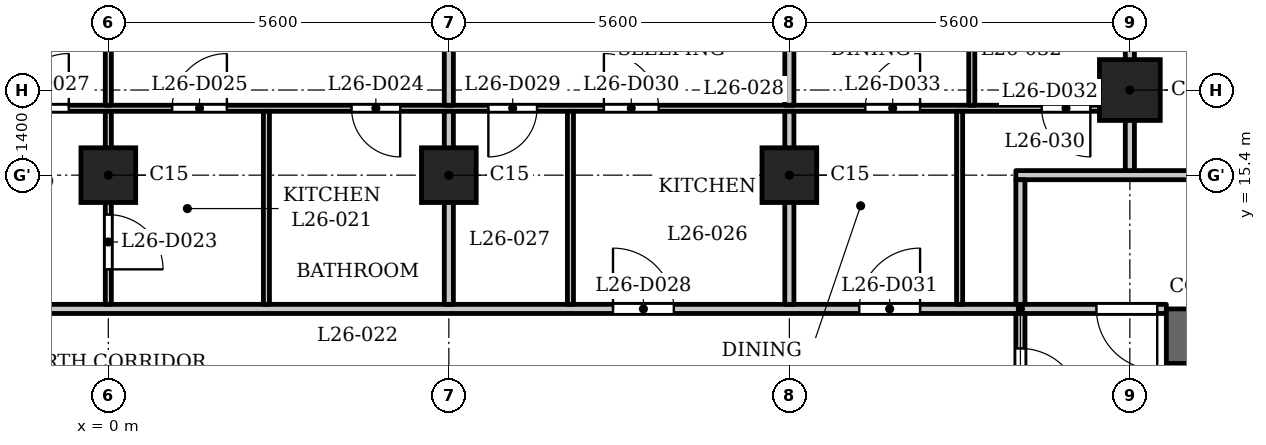
"""IFC4 building model, lengths in metres.
Left out: names, types, materials, properties, quantities, classifications, styles, units other than length and angle.
Written with IfcOpenShell. Run it as: python <this file> out.ifc"""

import sys

from ifc_helpers import new_model, si_unit, direction, frame, frame_2d, origin, origin_2d, place, context, subcontext, project, spatial, rectangle, extrude, element, fill, save


model = new_model("IFC4")
c1 = context("Model", 3, precision=1e-05, world=origin(), true_north=direction((0.0, 1.0)))
c2 = subcontext(c1, "Body", "Model", "MODEL_VIEW")
j1 = project(units=[si_unit("LENGTHUNIT", "METRE"), si_unit("PLANEANGLEUNIT", "RADIAN")], contexts=[c1])
p1 = place(None, origin())
s1 = spatial("IfcSite", under=j1, at=p1, CompositionType="ELEMENT")
p2 = place(p1, origin())
s2 = spatial("IfcBuilding", under=s1, at=p2, CompositionType="ELEMENT")
p3 = place(p2, frame((0.0, 0.0, 104.3)))
s3 = spatial("IfcBuildingStorey", under=s2, at=p3, CompositionType="ELEMENT", Elevation=104.3)
p4 = place(p3, frame((16.8, 16.8, 0.0), z_axis=(0.0, 0.0, 1.0), x_axis=(1.0, 0.0, 0.0)))
e1 = element("IfcColumn", 1, at=p4, inside=s3, PredefinedType="COLUMN", context=c2, shape_type="SweptSolid", body=[
    extrude(rectangle(XDim=1.0, YDim=1.0, at=origin_2d()), origin(), (0.0, 0.0, 1.0), 3.5),
])
for number, where, z_axis, x_axis in (
    (2, (0.0, 15.4, 0.0), (0.0, 0.0, 1.0), (1.0, 0.0, 0.0)),
    (3, (5.6, 15.4, 0.0), (0.0, 0.0, 1.0), (1.0, 0.0, 0.0)),
    (4, (11.2, 15.4, 0.0), (0.0, 0.0, 1.0), (1.0, 0.0, 0.0)),
):
    element("IfcColumn", number, at=place(p3, frame(where, z_axis=z_axis, x_axis=x_axis)), inside=s3, PredefinedType="COLUMN", context=c2, shape_type="SweptSolid", body=[
        extrude(rectangle(XDim=0.9, YDim=0.9, at=origin_2d()), origin(), (0.0, 0.0, 1.0), 3.5),
    ])
p5 = place(p3, frame((17.4, 12.75, 0.0), z_axis=(0.0, 0.0, 1.0), x_axis=(1.0, 0.0, 0.0)))
e5 = element("IfcWall", 5, at=p5, inside=s3, PredefinedType="SHEAR", context=c2, shape_type="SweptSolid", body=[
    extrude(rectangle(XDim=10.4, YDim=0.9, at=frame_2d((5.2, 0.0))), origin(), (0.0, 0.0, 1.0), 3.2),
])
p6 = place(p3, frame((17.6, -12.3, 0.0), z_axis=(0.0, 0.0, 1.0), x_axis=(0.0, 1.0, 0.0)))
e6 = element("IfcWall", 6, at=p6, inside=s3, PredefinedType="SHEAR", context=c2, shape_type="SweptSolid", body=[
    extrude(rectangle(XDim=24.6, YDim=0.4, at=frame_2d((12.3, 0.0))), origin(), (0.0, 0.0, 1.0), 3.2),
])
p7 = place(p6, frame((6.0, 0.0, 0.0)))
e7 = element("IfcOpeningElement", 7, at=p7, cuts=e6, PredefinedType="OPENING", context=c2, shape_type="SweptSolid", body=[
    extrude(rectangle(XDim=1.1, YDim=2.1, at=frame_2d((0.55, 1.05))), frame((0.0, 0.21, 0.0), z_axis=(0.0, -1.0, 0.0), x_axis=(1.0, 0.0, 0.0)), (0.0, 0.0, 1.0), 0.42),
])
p8 = place(p6, frame((8.4, 0.0, 0.0)))
e8 = element("IfcOpeningElement", 8, at=p8, cuts=e6, PredefinedType="OPENING", context=c2, shape_type="SweptSolid", body=[
    extrude(rectangle(XDim=1.1, YDim=2.1, at=frame_2d((0.55, 1.05))), frame((0.0, 0.21, 0.0), z_axis=(0.0, -1.0, 0.0), x_axis=(1.0, 0.0, 0.0)), (0.0, 0.0, 1.0), 0.42),
])
p9 = place(p6, frame((10.8, 0.0, 0.0)))
e9 = element("IfcOpeningElement", 9, at=p9, cuts=e6, PredefinedType="OPENING", context=c2, shape_type="SweptSolid", body=[
    extrude(rectangle(XDim=1.1, YDim=2.1, at=frame_2d((0.55, 1.05))), frame((0.0, 0.21, 0.0), z_axis=(0.0, -1.0, 0.0), x_axis=(1.0, 0.0, 0.0)), (0.0, 0.0, 1.0), 0.42),
])
p10 = place(p6, frame((16.75, 0.0, 0.0)))
e10 = element("IfcOpeningElement", 10, at=p10, cuts=e6, PredefinedType="OPENING", context=c2, shape_type="SweptSolid", body=[
    extrude(rectangle(XDim=0.9, YDim=2.1, at=frame_2d((0.45, 1.05))), frame((0.0, 0.21, 0.0), z_axis=(0.0, -1.0, 0.0), x_axis=(1.0, 0.0, 0.0)), (0.0, 0.0, 1.0), 0.42),
])
p11 = place(p6, frame((22.8, 0.0, 0.0)))
e11 = element("IfcOpeningElement", 11, at=p11, cuts=e6, PredefinedType="OPENING", context=c2, shape_type="SweptSolid", body=[
    extrude(rectangle(XDim=1.1, YDim=2.1, at=frame_2d((0.55, 1.05))), frame((0.0, 0.21, 0.0), z_axis=(0.0, -1.0, 0.0), x_axis=(1.0, 0.0, 0.0)), (0.0, 0.0, 1.0), 0.42),
])
p12 = place(p6, frame((0.7, 0.0, 0.0)))
e12 = element("IfcOpeningElement", 12, at=p12, cuts=e6, PredefinedType="OPENING", context=c2, shape_type="SweptSolid", body=[
    extrude(rectangle(XDim=1.1, YDim=2.1, at=frame_2d((0.55, 1.05))), frame((0.0, 0.21, 0.0), z_axis=(0.0, -1.0, 0.0), x_axis=(1.0, 0.0, 0.0)), (0.0, 0.0, 1.0), 0.42),
])
p13 = place(p6, frame((12.775, 0.0, 0.0)))
e13 = element("IfcOpeningElement", 13, at=p13, cuts=e6, PredefinedType="OPENING", context=c2, shape_type="SweptSolid", body=[
    extrude(rectangle(XDim=1.8, YDim=2.1, at=frame_2d((0.9, 1.05))), frame((0.0, 0.21, 0.0), z_axis=(0.0, -1.0, 0.0), x_axis=(1.0, 0.0, 0.0)), (0.0, 0.0, 1.0), 0.42),
])
p14 = place(p3, frame((-17.4, 13.2, 0.0), z_axis=(0.0, 0.0, 1.0), x_axis=(1.0, 0.0, 0.0)))
e14 = element("IfcWall", 14, at=p14, inside=s3, PredefinedType="PARTITIONING", context=c2, shape_type="SweptSolid", body=[
    extrude(rectangle(XDim=34.8, YDim=0.15, at=frame_2d((17.4, 0.0))), origin(), (0.0, 0.0, 1.0), 3.2),
])
p15 = place(p14, frame((0.25, 0.0, 0.0)))
e15 = element("IfcOpeningElement", 15, at=p15, cuts=e14, PredefinedType="OPENING", context=c2, shape_type="SweptSolid", body=[
    extrude(rectangle(XDim=1.0, YDim=2.1, at=frame_2d((0.5, 1.05))), frame((0.0, 0.085, 0.0), z_axis=(0.0, -1.0, 0.0), x_axis=(1.0, 0.0, 0.0)), (0.0, 0.0, 1.0), 0.17),
])
p16 = place(p14, frame((33.65, 0.0, 0.0)))
e16 = element("IfcOpeningElement", 16, at=p16, cuts=e14, PredefinedType="OPENING", context=c2, shape_type="SweptSolid", body=[
    extrude(rectangle(XDim=1.0, YDim=2.1, at=frame_2d((0.5, 1.05))), frame((0.0, 0.085, 0.0), z_axis=(0.0, -1.0, 0.0), x_axis=(1.0, 0.0, 0.0)), (0.0, 0.0, 1.0), 0.17),
])
p17 = place(p14, frame((4.55, 0.0, 0.0)))
e17 = element("IfcOpeningElement", 17, at=p17, cuts=e14, PredefinedType="OPENING", context=c2, shape_type="SweptSolid", body=[
    extrude(rectangle(XDim=1.0, YDim=2.1, at=frame_2d((0.5, 1.05))), frame((0.0, 0.085, 0.0), z_axis=(0.0, -1.0, 0.0), x_axis=(1.0, 0.0, 0.0)), (0.0, 0.0, 1.0), 0.17),
])
p18 = place(p14, frame((6.85, 0.0, 0.0)))
e18 = element("IfcOpeningElement", 18, at=p18, cuts=e14, PredefinedType="OPENING", context=c2, shape_type="SweptSolid", body=[
    extrude(rectangle(XDim=1.0, YDim=2.1, at=frame_2d((0.5, 1.05))), frame((0.0, 0.085, 0.0), z_axis=(0.0, -1.0, 0.0), x_axis=(1.0, 0.0, 0.0)), (0.0, 0.0, 1.0), 0.17),
])
p19 = place(p14, frame((12.5, 0.0, 0.0)))
e19 = element("IfcOpeningElement", 19, at=p19, cuts=e14, PredefinedType="OPENING", context=c2, shape_type="SweptSolid", body=[
    extrude(rectangle(XDim=1.0, YDim=2.1, at=frame_2d((0.5, 1.05))), frame((0.0, 0.085, 0.0), z_axis=(0.0, -1.0, 0.0), x_axis=(1.0, 0.0, 0.0)), (0.0, 0.0, 1.0), 0.17),
])
p20 = place(p14, frame((25.7, 0.0, 0.0)))
e20 = element("IfcOpeningElement", 20, at=p20, cuts=e14, PredefinedType="OPENING", context=c2, shape_type="SweptSolid", body=[
    extrude(rectangle(XDim=1.0, YDim=2.1, at=frame_2d((0.5, 1.05))), frame((0.0, 0.085, 0.0), z_axis=(0.0, -1.0, 0.0), x_axis=(1.0, 0.0, 0.0)), (0.0, 0.0, 1.0), 0.17),
])
p21 = place(p14, frame((29.75, 0.0, 0.0)))
e21 = element("IfcOpeningElement", 21, at=p21, cuts=e14, PredefinedType="OPENING", context=c2, shape_type="SweptSolid", body=[
    extrude(rectangle(XDim=1.0, YDim=2.1, at=frame_2d((0.5, 1.05))), frame((0.0, 0.085, 0.0), z_axis=(0.0, -1.0, 0.0), x_axis=(1.0, 0.0, 0.0)), (0.0, 0.0, 1.0), 0.17),
])
p22 = place(p3, frame((14.925, 15.4, 0.0), z_axis=(0.0, 0.0, 1.0), x_axis=(1.0, 0.0, 0.0)))
e22 = element("IfcWall", 22, at=p22, inside=s3, PredefinedType="PARTITIONING", context=c2, shape_type="SweptSolid", body=[
    extrude(rectangle(XDim=12.559, YDim=0.15, at=frame_2d((6.279, 0.0))), origin(), (0.0, 0.0, 1.0), 3.2),
])
p23 = place(p22, frame((5.825, 0.0, 0.0)))
e23 = element("IfcOpeningElement", 23, at=p23, cuts=e22, PredefinedType="OPENING", context=c2, shape_type="SweptSolid", body=[
    extrude(rectangle(XDim=1.0, YDim=2.1, at=frame_2d((0.5, 1.05))), frame((0.0, 0.085, 0.0), z_axis=(0.0, -1.0, 0.0), x_axis=(1.0, 0.0, 0.0)), (0.0, 0.0, 1.0), 0.17),
])
p24 = place(p3, frame((-16.725, 16.5, 0.0), z_axis=(0.0, 0.0, 1.0), x_axis=(1.0, 0.0, 0.0)))
e24 = element("IfcWall", 24, at=p24, inside=s3, PredefinedType="PARTITIONING", context=c2, shape_type="SweptSolid", body=[
    extrude(rectangle(XDim=33.45, YDim=0.1, at=frame_2d((16.725, 0.0))), origin(), (0.0, 0.0, 1.0), 3.2),
])
p25 = place(p24, frame((1.075, 0.0, 0.0)))
e25 = element("IfcOpeningElement", 25, at=p25, cuts=e24, PredefinedType="OPENING", context=c2, shape_type="SweptSolid", body=[
    extrude(rectangle(XDim=0.8, YDim=2.1, at=frame_2d((0.4, 1.05))), frame((0.0, 0.06, 0.0), z_axis=(0.0, -1.0, 0.0), x_axis=(1.0, 0.0, 0.0)), (0.0, 0.0, 1.0), 0.12),
])
p26 = place(p24, frame((3.975, 0.0, 0.0)))
e26 = element("IfcOpeningElement", 26, at=p26, cuts=e24, PredefinedType="OPENING", context=c2, shape_type="SweptSolid", body=[
    extrude(rectangle(XDim=0.9, YDim=2.1, at=frame_2d((0.45, 1.05))), frame((0.0, 0.06, 0.0), z_axis=(0.0, -1.0, 0.0), x_axis=(1.0, 0.0, 0.0)), (0.0, 0.0, 1.0), 0.12),
])
p27 = place(p24, frame((8.975, 0.0, 0.0)))
e27 = element("IfcOpeningElement", 27, at=p27, cuts=e24, PredefinedType="OPENING", context=c2, shape_type="SweptSolid", body=[
    extrude(rectangle(XDim=0.8, YDim=2.1, at=frame_2d((0.4, 1.05))), frame((0.0, 0.06, 0.0), z_axis=(0.0, -1.0, 0.0), x_axis=(1.0, 0.0, 0.0)), (0.0, 0.0, 1.0), 0.12),
])
p28 = place(p24, frame((6.325, 0.0, 0.0)))
e28 = element("IfcOpeningElement", 28, at=p28, cuts=e24, PredefinedType="OPENING", context=c2, shape_type="SweptSolid", body=[
    extrude(rectangle(XDim=0.9, YDim=2.1, at=frame_2d((0.45, 1.05))), frame((0.0, 0.06, 0.0), z_axis=(0.0, -1.0, 0.0), x_axis=(1.0, 0.0, 0.0)), (0.0, 0.0, 1.0), 0.12),
])
p29 = place(p24, frame((20.725, 0.0, 0.0)))
e29 = element("IfcOpeningElement", 29, at=p29, cuts=e24, PredefinedType="OPENING", context=c2, shape_type="SweptSolid", body=[
    extrude(rectangle(XDim=0.8, YDim=2.1, at=frame_2d((0.4, 1.05))), frame((0.0, 0.06, 0.0), z_axis=(0.0, -1.0, 0.0), x_axis=(1.0, 0.0, 0.0)), (0.0, 0.0, 1.0), 0.12),
])
p30 = place(p24, frame((17.775, 0.0, 0.0)))
e30 = element("IfcOpeningElement", 30, at=p30, cuts=e24, PredefinedType="OPENING", context=c2, shape_type="SweptSolid", body=[
    extrude(rectangle(XDim=0.9, YDim=2.1, at=frame_2d((0.45, 1.05))), frame((0.0, 0.06, 0.0), z_axis=(0.0, -1.0, 0.0), x_axis=(1.0, 0.0, 0.0)), (0.0, 0.0, 1.0), 0.12),
])
p31 = place(p24, frame((11.825, 0.0, 0.0)))
e31 = element("IfcOpeningElement", 31, at=p31, cuts=e24, PredefinedType="OPENING", context=c2, shape_type="SweptSolid", body=[
    extrude(rectangle(XDim=0.9, YDim=2.1, at=frame_2d((0.45, 1.05))), frame((0.0, 0.06, 0.0), z_axis=(0.0, -1.0, 0.0), x_axis=(1.0, 0.0, 0.0)), (0.0, 0.0, 1.0), 0.12),
])
p32 = place(p24, frame((15.175, 0.0, 0.0)))
e32 = element("IfcOpeningElement", 32, at=p32, cuts=e24, PredefinedType="OPENING", context=c2, shape_type="SweptSolid", body=[
    extrude(rectangle(XDim=0.9, YDim=2.1, at=frame_2d((0.45, 1.05))), frame((0.0, 0.06, 0.0), z_axis=(0.0, -1.0, 0.0), x_axis=(1.0, 0.0, 0.0)), (0.0, 0.0, 1.0), 0.12),
])
p33 = place(p24, frame((22.975, 0.0, 0.0)))
e33 = element("IfcOpeningElement", 33, at=p33, cuts=e24, PredefinedType="OPENING", context=c2, shape_type="SweptSolid", body=[
    extrude(rectangle(XDim=0.8, YDim=2.1, at=frame_2d((0.4, 1.05))), frame((0.0, 0.06, 0.0), z_axis=(0.0, -1.0, 0.0), x_axis=(1.0, 0.0, 0.0)), (0.0, 0.0, 1.0), 0.12),
])
p34 = place(p24, frame((24.875, 0.0, 0.0)))
e34 = element("IfcOpeningElement", 34, at=p34, cuts=e24, PredefinedType="OPENING", context=c2, shape_type="SweptSolid", body=[
    extrude(rectangle(XDim=0.9, YDim=2.1, at=frame_2d((0.45, 1.05))), frame((0.0, 0.06, 0.0), z_axis=(0.0, -1.0, 0.0), x_axis=(1.0, 0.0, 0.0)), (0.0, 0.0, 1.0), 0.12),
])
p35 = place(p24, frame((32.075, 0.0, 0.0)))
e35 = element("IfcOpeningElement", 35, at=p35, cuts=e24, PredefinedType="OPENING", context=c2, shape_type="SweptSolid", body=[
    extrude(rectangle(XDim=0.8, YDim=2.1, at=frame_2d((0.4, 1.05))), frame((0.0, 0.06, 0.0), z_axis=(0.0, -1.0, 0.0), x_axis=(1.0, 0.0, 0.0)), (0.0, 0.0, 1.0), 0.12),
])
p36 = place(p24, frame((29.175, 0.0, 0.0)))
e36 = element("IfcOpeningElement", 36, at=p36, cuts=e24, PredefinedType="OPENING", context=c2, shape_type="SweptSolid", body=[
    extrude(rectangle(XDim=0.9, YDim=2.1, at=frame_2d((0.45, 1.05))), frame((0.0, 0.06, 0.0), z_axis=(0.0, -1.0, 0.0), x_axis=(1.0, 0.0, 0.0)), (0.0, 0.0, 1.0), 0.12),
])
p37 = place(p3, frame((0.0, 13.275, 0.0), z_axis=(0.0, 0.0, 1.0), x_axis=(0.0, 1.0, 0.0)))
e37 = element("IfcWall", 37, at=p37, inside=s3, PredefinedType="PARTITIONING", context=c2, shape_type="SweptSolid", body=[
    extrude(rectangle(XDim=3.175, YDim=0.1, at=frame_2d((1.587, 0.0))), origin(), (0.0, 0.0, 1.0), 3.2),
])
p38 = place(p37, frame((0.576, 0.0, 0.0)))
e38 = element("IfcOpeningElement", 38, at=p38, cuts=e37, PredefinedType="OPENING", context=c2, shape_type="SweptSolid", body=[
    extrude(rectangle(XDim=0.9, YDim=2.1, at=frame_2d((0.45, 1.05))), frame((0.0, 0.06, 0.0), z_axis=(0.0, -1.0, 0.0), x_axis=(1.0, 0.0, 0.0)), (0.0, 0.0, 1.0), 0.12),
])
p39 = place(p3, frame((0.0, 16.55, 0.0), z_axis=(0.0, 0.0, 1.0), x_axis=(0.0, 1.0, 0.0)))
e39 = element("IfcWall", 39, at=p39, inside=s3, PredefinedType="PARTITIONING", context=c2, shape_type="SweptSolid", body=[
    extrude(rectangle(XDim=6.48, YDim=0.1, at=frame_2d((3.24, 0.0))), origin(), (0.0, 0.0, 1.0), 3.2),
])
p40 = place(p3, frame((2.6, 13.275, 0.0), z_axis=(0.0, 0.0, 1.0), x_axis=(0.0, 1.0, 0.0)))
e40 = element("IfcWall", 40, at=p40, inside=s3, PredefinedType="PARTITIONING", context=c2, shape_type="SweptSolid", body=[
    extrude(rectangle(XDim=3.175, YDim=0.1, at=frame_2d((1.587, 0.0))), origin(), (0.0, 0.0, 1.0), 3.2),
])
p41 = place(p3, frame((5.6, 13.275, 0.0), z_axis=(0.0, 0.0, 1.0), x_axis=(0.0, 1.0, 0.0)))
e41 = element("IfcWall", 41, at=p41, inside=s3, PredefinedType="PARTITIONING", context=c2, shape_type="SweptSolid", body=[
    extrude(rectangle(XDim=3.175, YDim=0.15, at=frame_2d((1.587, 0.0))), origin(), (0.0, 0.0, 1.0), 3.2),
])
p42 = place(p3, frame((5.6, 16.55, 0.0), z_axis=(0.0, 0.0, 1.0), x_axis=(0.0, 1.0, 0.0)))
e42 = element("IfcWall", 42, at=p42, inside=s3, PredefinedType="PARTITIONING", context=c2, shape_type="SweptSolid", body=[
    extrude(rectangle(XDim=6.48, YDim=0.15, at=frame_2d((3.24, 0.0))), origin(), (0.0, 0.0, 1.0), 3.2),
])
p43 = place(p3, frame((7.6, 13.275, 0.0), z_axis=(0.0, 0.0, 1.0), x_axis=(0.0, 1.0, 0.0)))
e43 = element("IfcWall", 43, at=p43, inside=s3, PredefinedType="PARTITIONING", context=c2, shape_type="SweptSolid", body=[
    extrude(rectangle(XDim=3.175, YDim=0.1, at=frame_2d((1.587, 0.0))), origin(), (0.0, 0.0, 1.0), 3.2),
])
p44 = place(p3, frame((11.2, 13.275, 0.0), z_axis=(0.0, 0.0, 1.0), x_axis=(0.0, 1.0, 0.0)))
e44 = element("IfcWall", 44, at=p44, inside=s3, PredefinedType="PARTITIONING", context=c2, shape_type="SweptSolid", body=[
    extrude(rectangle(XDim=3.175, YDim=0.15, at=frame_2d((1.587, 0.0))), origin(), (0.0, 0.0, 1.0), 3.2),
])
p45 = place(p3, frame((11.2, 16.55, 0.0), z_axis=(0.0, 0.0, 1.0), x_axis=(0.0, 1.0, 0.0)))
e45 = element("IfcWall", 45, at=p45, inside=s3, PredefinedType="PARTITIONING", context=c2, shape_type="SweptSolid", body=[
    extrude(rectangle(XDim=6.48, YDim=0.15, at=frame_2d((3.24, 0.0))), origin(), (0.0, 0.0, 1.0), 3.2),
])
p46 = place(p3, frame((14.0, 13.275, 0.0), z_axis=(0.0, 0.0, 1.0), x_axis=(0.0, 1.0, 0.0)))
e46 = element("IfcWall", 46, at=p46, inside=s3, PredefinedType="PARTITIONING", context=c2, shape_type="SweptSolid", body=[
    extrude(rectangle(XDim=3.175, YDim=0.1, at=frame_2d((1.587, 0.0))), origin(), (0.0, 0.0, 1.0), 3.2),
])
p47 = place(p3, frame((14.2, 16.55, 0.0), z_axis=(0.0, 0.0, 1.0), x_axis=(0.0, 1.0, 0.0)))
e47 = element("IfcWall", 47, at=p47, inside=s3, PredefinedType="PARTITIONING", context=c2, shape_type="SweptSolid", body=[
    extrude(rectangle(XDim=5.53, YDim=0.1, at=frame_2d((2.765, 0.0))), origin(), (0.0, 0.0, 1.0), 3.2),
])
p48 = place(p47, frame((4.35, 0.0, 0.0)))
e48 = element("IfcOpeningElement", 48, at=p48, cuts=e47, PredefinedType="OPENING", context=c2, shape_type="SweptSolid", body=[
    extrude(rectangle(XDim=0.9, YDim=2.1, at=frame_2d((0.45, 1.05))), frame((0.0, 0.06, 0.0), z_axis=(0.0, -1.0, 0.0), x_axis=(1.0, 0.0, 0.0)), (0.0, 0.0, 1.0), 0.12),
])
p49 = place(p3, frame((15.0, 6.769, 0.0), z_axis=(0.0, 0.0, 1.0), x_axis=(0.0, 1.0, 0.0)))
e49 = element("IfcWall", 49, at=p49, inside=s3, PredefinedType="PARTITIONING", context=c2, shape_type="SweptSolid", body=[
    extrude(rectangle(XDim=6.356, YDim=0.15, at=frame_2d((3.178, 0.0))), origin(), (0.0, 0.0, 1.0), 3.2),
])
p50 = place(p49, frame((4.781, 0.0, 0.0)))
e50 = element("IfcOpeningElement", 50, at=p50, cuts=e49, PredefinedType="OPENING", context=c2, shape_type="SweptSolid", body=[
    extrude(rectangle(XDim=1.0, YDim=2.1, at=frame_2d((0.5, 1.05))), frame((0.0, 0.085, 0.0), z_axis=(0.0, -1.0, 0.0), x_axis=(1.0, 0.0, 0.0)), (0.0, 0.0, 1.0), 0.17),
])
p51 = place(p3, frame((15.0, 13.275, 0.0), z_axis=(0.0, 0.0, 1.0), x_axis=(0.0, 1.0, 0.0)))
e51 = element("IfcWall", 51, at=p51, inside=s3, PredefinedType="PARTITIONING", context=c2, shape_type="SweptSolid", body=[
    extrude(rectangle(XDim=2.05, YDim=0.15, at=frame_2d((1.025, 0.0))), origin(), (0.0, 0.0, 1.0), 3.2),
])
p52 = place(p3, frame((16.8, 15.475, 0.0), z_axis=(0.0, 0.0, 1.0), x_axis=(0.0, 1.0, 0.0)))
e52 = element("IfcWall", 52, at=p52, inside=s3, PredefinedType="PARTITIONING", context=c2, shape_type="SweptSolid", body=[
    extrude(rectangle(XDim=7.555, YDim=0.15, at=frame_2d((3.777, 0.0))), origin(), (0.0, 0.0, 1.0), 3.2),
])
p53 = place(p50, origin())
e53 = element("IfcDoor", 53, at=p53, inside=s3, OperationType="SINGLE_SWING_LEFT", PredefinedType="DOOR", context=c2, shape_type="SweptSolid", body=[
    extrude(rectangle(XDim=1.0, YDim=2.1, at=frame_2d((0.5, 1.05))), frame((0.0, 0.025, 0.0), z_axis=(0.0, -1.0, 0.0), x_axis=(1.0, 0.0, 0.0)), (0.0, 0.0, 1.0), 0.05),
])
fill(e50, e53)
p54 = place(p16, origin())
e54 = element("IfcDoor", 54, at=p54, inside=s3, OperationType="SINGLE_SWING_RIGHT", PredefinedType="DOOR", context=c2, shape_type="SweptSolid", body=[
    extrude(rectangle(XDim=1.0, YDim=2.1, at=frame_2d((0.5, 1.05))), frame((0.0, 0.025, 0.0), z_axis=(0.0, -1.0, 0.0), x_axis=(1.0, 0.0, 0.0)), (0.0, 0.0, 1.0), 0.05),
])
fill(e16, e54)
p55 = place(p38, origin())
e55 = element("IfcDoor", 55, at=p55, inside=s3, OperationType="SINGLE_SWING_LEFT", PredefinedType="DOOR", context=c2, shape_type="SweptSolid", body=[
    extrude(rectangle(XDim=0.9, YDim=2.1, at=frame_2d((0.45, 1.05))), frame((0.0, 0.025, 0.0), z_axis=(0.0, -1.0, 0.0), x_axis=(1.0, 0.0, 0.0)), (0.0, 0.0, 1.0), 0.05),
])
fill(e38, e55)
p56 = place(p29, origin())
e56 = element("IfcDoor", 56, at=p56, inside=s3, OperationType="SINGLE_SWING_RIGHT", PredefinedType="DOOR", context=c2, shape_type="SweptSolid", body=[
    extrude(rectangle(XDim=0.8, YDim=2.1, at=frame_2d((0.4, 1.05))), frame((0.0, 0.025, 0.0), z_axis=(0.0, -1.0, 0.0), x_axis=(1.0, 0.0, 0.0)), (0.0, 0.0, 1.0), 0.05),
])
fill(e29, e56)
p57 = place(p30, origin())
e57 = element("IfcDoor", 57, at=p57, inside=s3, OperationType="SINGLE_SWING_LEFT", PredefinedType="DOOR", context=c2, shape_type="SweptSolid", body=[
    extrude(rectangle(XDim=0.9, YDim=2.1, at=frame_2d((0.45, 1.05))), frame((0.0, 0.025, 0.0), z_axis=(0.0, -1.0, 0.0), x_axis=(1.0, 0.0, 0.0)), (0.0, 0.0, 1.0), 0.05),
])
fill(e30, e57)
p58 = place(p32, origin())
e58 = element("IfcDoor", 58, at=p58, inside=s3, OperationType="SINGLE_SWING_LEFT", PredefinedType="DOOR", context=c2, shape_type="SweptSolid", body=[
    extrude(rectangle(XDim=0.9, YDim=2.1, at=frame_2d((0.45, 1.05))), frame((0.0, 0.025, 0.0), z_axis=(0.0, -1.0, 0.0), x_axis=(1.0, 0.0, 0.0)), (0.0, 0.0, 1.0), 0.05),
])
fill(e32, e58)
p59 = place(p20, origin())
e59 = element("IfcDoor", 59, at=p59, inside=s3, OperationType="SINGLE_SWING_RIGHT", PredefinedType="DOOR", context=c2, shape_type="SweptSolid", body=[
    extrude(rectangle(XDim=1.0, YDim=2.1, at=frame_2d((0.5, 1.05))), frame((0.0, 0.025, 0.0), z_axis=(0.0, -1.0, 0.0), x_axis=(1.0, 0.0, 0.0)), (0.0, 0.0, 1.0), 0.05),
])
fill(e20, e59)
p60 = place(p33, origin())
e60 = element("IfcDoor", 60, at=p60, inside=s3, OperationType="SINGLE_SWING_LEFT", PredefinedType="DOOR", context=c2, shape_type="SweptSolid", body=[
    extrude(rectangle(XDim=0.8, YDim=2.1, at=frame_2d((0.4, 1.05))), frame((0.0, 0.025, 0.0), z_axis=(0.0, -1.0, 0.0), x_axis=(1.0, 0.0, 0.0)), (0.0, 0.0, 1.0), 0.05),
])
fill(e33, e60)
p61 = place(p34, origin())
e61 = element("IfcDoor", 61, at=p61, inside=s3, OperationType="SINGLE_SWING_RIGHT", PredefinedType="DOOR", context=c2, shape_type="SweptSolid", body=[
    extrude(rectangle(XDim=0.9, YDim=2.1, at=frame_2d((0.45, 1.05))), frame((0.0, 0.025, 0.0), z_axis=(0.0, -1.0, 0.0), x_axis=(1.0, 0.0, 0.0)), (0.0, 0.0, 1.0), 0.05),
])
fill(e34, e61)
p62 = place(p21, origin())
e62 = element("IfcDoor", 62, at=p62, inside=s3, OperationType="SINGLE_SWING_LEFT", PredefinedType="DOOR", context=c2, shape_type="SweptSolid", body=[
    extrude(rectangle(XDim=1.0, YDim=2.1, at=frame_2d((0.5, 1.05))), frame((0.0, 0.025, 0.0), z_axis=(0.0, -1.0, 0.0), x_axis=(1.0, 0.0, 0.0)), (0.0, 0.0, 1.0), 0.05),
])
fill(e21, e62)
p63 = place(p35, origin())
e63 = element("IfcDoor", 63, at=p63, inside=s3, OperationType="SINGLE_SWING_RIGHT", PredefinedType="DOOR", context=c2, shape_type="SweptSolid", body=[
    extrude(rectangle(XDim=0.8, YDim=2.1, at=frame_2d((0.4, 1.05))), frame((0.0, 0.025, 0.0), z_axis=(0.0, -1.0, 0.0), x_axis=(1.0, 0.0, 0.0)), (0.0, 0.0, 1.0), 0.05),
])
fill(e35, e63)
p64 = place(p36, origin())
e64 = element("IfcDoor", 64, at=p64, inside=s3, OperationType="SINGLE_SWING_LEFT", PredefinedType="DOOR", context=c2, shape_type="SweptSolid", body=[
    extrude(rectangle(XDim=0.9, YDim=2.1, at=frame_2d((0.45, 1.05))), frame((0.0, 0.025, 0.0), z_axis=(0.0, -1.0, 0.0), x_axis=(1.0, 0.0, 0.0)), (0.0, 0.0, 1.0), 0.05),
])
fill(e36, e64)
save(model, sys.argv[1])
